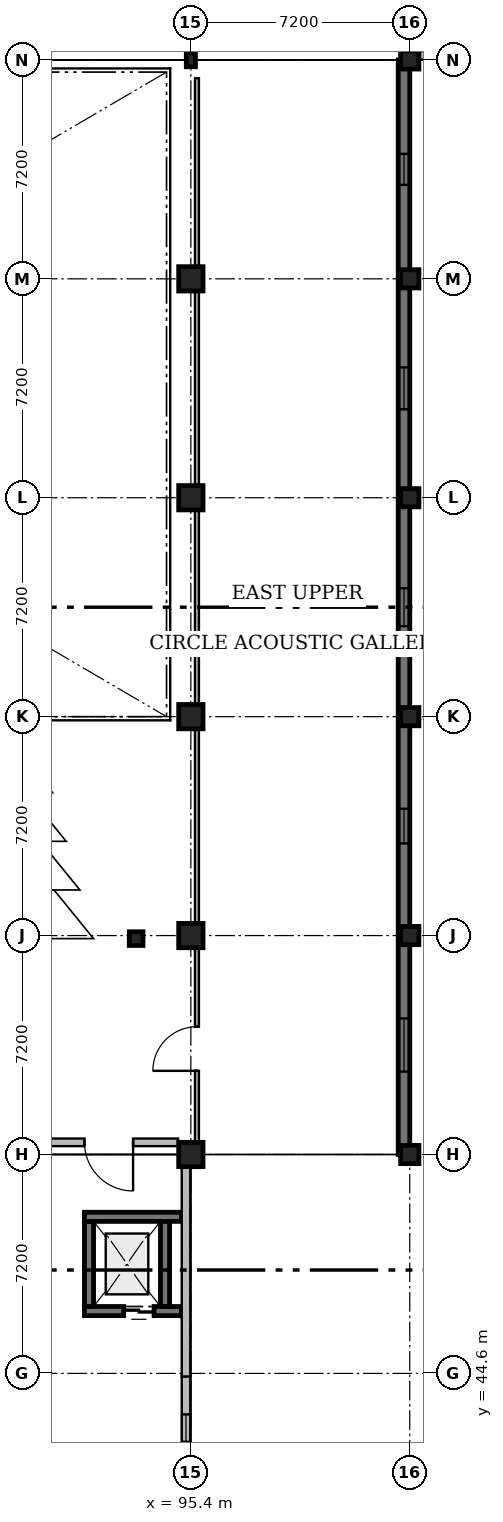
"""IFC4 building model, lengths in metres.
Left out: names, types, materials, properties, quantities, classifications, styles, units other than length and angle.
Written with IfcOpenShell. Run it as: python <this file> out.ifc"""

import sys

from ifc_helpers import new_model, si_unit, direction, frame, frame_2d, origin, origin_2d, place, context, subcontext, project, spatial, rectangle, i_section, extrude, element, fill, save


model = new_model("IFC4")
c1 = context("Model", 3, precision=1e-05, world=origin(), true_north=direction((0.0, 1.0)))
c2 = subcontext(c1, "Body", "Model", "MODEL_VIEW")
j1 = project(units=[si_unit("LENGTHUNIT", "METRE"), si_unit("PLANEANGLEUNIT", "RADIAN")], contexts=[c1])
p1 = place(None, origin())
s1 = spatial("IfcSite", under=j1, at=p1, CompositionType="ELEMENT")
p2 = place(p1, origin())
s2 = spatial("IfcBuilding", under=s1, at=p2, CompositionType="ELEMENT")
p3 = place(p2, frame((0.0, 0.0, 9.0)))
s3 = spatial("IfcBuildingStorey", under=s2, at=p3, CompositionType="ELEMENT", Elevation=9.0)
for number, where, z_axis, x_axis in (
    (1, (95.4, 51.8, 0.0), (0.0, 0.0, 1.0), (1.0, 0.0, 0.0)),
    (2, (95.4, 59.0, 0.0), (0.0, 0.0, 1.0), (1.0, 0.0, 0.0)),
    (3, (95.4, 66.2, 0.0), (0.0, 0.0, 1.0), (1.0, 0.0, 0.0)),
    (4, (95.4, 73.4, 0.0), (0.0, 0.0, 1.0), (1.0, 0.0, 0.0)),
    (5, (95.4, 80.6, 0.0), (0.0, 0.0, 1.0), (1.0, 0.0, 0.0)),
):
    element("IfcColumn", number, at=place(p3, frame(where, z_axis=z_axis, x_axis=x_axis)), inside=s3, PredefinedType="COLUMN", context=c2, shape_type="SweptSolid", body=[
        extrude(rectangle(XDim=0.8, YDim=0.8, at=origin_2d()), origin(), (0.0, 0.0, 1.0), 4.2),
    ])
p4 = place(p3, frame((95.4, 87.8, 0.0), z_axis=(0.0, 0.0, 1.0), x_axis=(1.0, 0.0, 0.0)))
e6 = element("IfcColumn", 6, at=p4, inside=s3, PredefinedType="COLUMN", context=c2, shape_type="SweptSolid", body=[
    extrude(i_section(OverallWidth=0.3, OverallDepth=0.45, WebThickness=0.014, FlangeThickness=0.026, FilletRadius=0.027, at=origin_2d()), origin(), (0.0, 0.0, 1.0), 4.2),
])
for number, where, z_axis, x_axis in (
    (7, (102.6, 51.8, 0.0), (0.0, 0.0, 1.0), (1.0, 0.0, 0.0)),
    (8, (102.6, 59.0, 0.0), (0.0, 0.0, 1.0), (1.0, 0.0, 0.0)),
    (9, (102.6, 66.2, 0.0), (0.0, 0.0, 1.0), (1.0, 0.0, 0.0)),
    (10, (102.6, 73.4, 0.0), (0.0, 0.0, 1.0), (1.0, 0.0, 0.0)),
    (11, (102.6, 80.6, 0.0), (0.0, 0.0, 1.0), (1.0, 0.0, 0.0)),
    (12, (102.6, 87.8, 0.0), (0.0, 0.0, 1.0), (1.0, 0.0, 0.0)),
):
    element("IfcColumn", number, at=place(p3, frame(where, z_axis=z_axis, x_axis=x_axis)), inside=s3, PredefinedType="COLUMN", context=c2, shape_type="SweptSolid", body=[
        extrude(rectangle(XDim=0.6, YDim=0.6, at=origin_2d()), origin(), (0.0, 0.0, 1.0), 4.2),
    ])
p5 = place(p3, frame((93.6, 58.9, 0.0), z_axis=(0.0, 0.0, 1.0), x_axis=(1.0, 0.0, 0.0)))
e13 = element("IfcColumn", 13, at=p5, inside=s3, PredefinedType="COLUMN", context=c2, shape_type="SweptSolid", body=[
    extrude(rectangle(XDim=0.45, YDim=0.45, at=origin_2d()), origin(), (0.0, 0.0, 1.0), 1.05),
])
p6 = place(p3, frame((95.09, 46.65, 0.0), z_axis=(0.0, 0.0, 1.0), x_axis=(-1.0, 0.0, 0.0)))
e14 = element("IfcWall", 14, at=p6, inside=s3, PredefinedType="SOLIDWALL", context=c2, shape_type="SweptSolid", body=[
    extrude(rectangle(XDim=3.19, YDim=0.3, at=frame_2d((1.595, 0.0))), origin(), (0.0, 0.0, 1.0), 4.5),
])
p7 = place(p6, frame((0.9, 0.0, 0.0)))
e15 = element("IfcOpeningElement", 15, at=p7, cuts=e14, PredefinedType="OPENING", context=c2, shape_type="SweptSolid", body=[
    extrude(rectangle(XDim=1.0, YDim=2.1, at=frame_2d((0.5, 1.05))), frame((0.0, 0.17, 0.0), z_axis=(0.0, -1.0, 0.0), x_axis=(1.0, 0.0, 0.0)), (0.0, 0.0, 1.0), 0.34),
])
p8 = place(p3, frame((92.05, 46.8, 0.0), z_axis=(0.0, 0.0, 1.0), x_axis=(0.0, 1.0, 0.0)))
e16 = element("IfcWall", 16, at=p8, inside=s3, PredefinedType="SOLIDWALL", context=c2, shape_type="SweptSolid", body=[
    extrude(rectangle(XDim=2.8, YDim=0.3, at=frame_2d((1.4, 0.0))), origin(), (0.0, 0.0, 1.0), 4.5),
])
p9 = place(p3, frame((91.9, 49.75, 0.0), z_axis=(0.0, 0.0, 1.0), x_axis=(1.0, 0.0, 0.0)))
e17 = element("IfcWall", 17, at=p9, inside=s3, PredefinedType="SOLIDWALL", context=c2, shape_type="SweptSolid", body=[
    extrude(rectangle(XDim=3.19, YDim=0.3, at=frame_2d((1.595, 0.0))), origin(), (0.0, 0.0, 1.0), 4.5),
])
p10 = place(p3, frame((94.55, 49.6, 0.0), z_axis=(0.0, 0.0, 1.0), x_axis=(0.0, -1.0, 0.0)))
e18 = element("IfcWall", 18, at=p10, inside=s3, PredefinedType="SOLIDWALL", context=c2, shape_type="SweptSolid", body=[
    extrude(rectangle(XDim=2.8, YDim=0.3, at=frame_2d((1.4, 0.0))), origin(), (0.0, 0.0, 1.0), 4.5),
])
p11 = place(p3, frame((95.24, 37.705, 0.0), z_axis=(0.0, 0.0, 1.0), x_axis=(0.0, 1.0, 0.0)))
e19 = element("IfcWall", 19, at=p11, inside=s3, PredefinedType="SOLIDWALL", context=c2, shape_type="SweptSolid", body=[
    extrude(rectangle(XDim=6.795, YDim=0.28, at=frame_2d((3.397, 0.0))), origin(), (0.0, 0.0, 1.0), 3.383),
])
p12 = place(p11, frame((1.249, 0.0, 0.95)))
e20 = element("IfcOpeningElement", 20, at=p12, cuts=e19, PredefinedType="OPENING", context=c2, shape_type="SweptSolid", body=[
    extrude(rectangle(XDim=0.9, YDim=1.55, at=frame_2d((0.45, 0.775))), frame((0.0, 0.16, 0.0), z_axis=(0.0, -1.0, 0.0), x_axis=(1.0, 0.0, 0.0)), (0.0, 0.0, 1.0), 0.32),
])
p13 = place(p11, frame((4.646, 0.0, 0.95)))
e21 = element("IfcOpeningElement", 21, at=p13, cuts=e19, PredefinedType="OPENING", context=c2, shape_type="SweptSolid", body=[
    extrude(rectangle(XDim=0.9, YDim=1.55, at=frame_2d((0.45, 0.775))), frame((0.0, 0.16, 0.0), z_axis=(0.0, -1.0, 0.0), x_axis=(1.0, 0.0, 0.0)), (0.0, 0.0, 1.0), 0.32),
])
p14 = place(p3, frame((95.24, 44.5, 0.0), z_axis=(0.0, 0.0, 1.0), x_axis=(0.0, 1.0, 0.0)))
e22 = element("IfcWall", 22, at=p14, inside=s3, PredefinedType="SOLIDWALL", context=c2, shape_type="SweptSolid", body=[
    extrude(rectangle(XDim=7.35, YDim=0.28, at=frame_2d((3.675, 0.0))), origin(), (0.0, 0.0, 1.0), 0.785),
])
p15 = place(p3, frame((102.41, 87.8, 0.0), z_axis=(0.0, 0.0, 1.0), x_axis=(0.0, -1.0, 0.0)))
e23 = element("IfcWall", 23, at=p15, inside=s3, PredefinedType="SOLIDWALL", context=c2, shape_type="SweptSolid", body=[
    extrude(rectangle(XDim=36.0, YDim=0.38, at=frame_2d((18.0, 0.0))), origin(), (0.0, 0.0, 1.0), 3.96),
])
p16 = place(p15, frame((3.09, 0.0, 0.95)))
e24 = element("IfcOpeningElement", 24, at=p16, cuts=e23, PredefinedType="OPENING", context=c2, shape_type="SweptSolid", body=[
    extrude(rectangle(XDim=1.02, YDim=1.8, at=frame_2d((0.51, 0.9))), frame((0.0, 0.21, 0.0), z_axis=(0.0, -1.0, 0.0), x_axis=(1.0, 0.0, 0.0)), (0.0, 0.0, 1.0), 0.42),
])
p17 = place(p15, frame((10.11, 0.0, 0.95)))
e25 = element("IfcOpeningElement", 25, at=p17, cuts=e23, PredefinedType="OPENING", context=c2, shape_type="SweptSolid", body=[
    extrude(rectangle(XDim=1.38, YDim=1.95, at=frame_2d((0.69, 0.975))), frame((0.0, 0.21, 0.0), z_axis=(0.0, -1.0, 0.0), x_axis=(1.0, 0.0, 0.0)), (0.0, 0.0, 1.0), 0.42),
])
p18 = place(p15, frame((17.375, 0.0, 0.95)))
e26 = element("IfcOpeningElement", 26, at=p18, cuts=e23, PredefinedType="OPENING", context=c2, shape_type="SweptSolid", body=[
    extrude(rectangle(XDim=1.25, YDim=1.9, at=frame_2d((0.625, 0.95))), frame((0.0, 0.21, 0.0), z_axis=(0.0, -1.0, 0.0), x_axis=(1.0, 0.0, 0.0)), (0.0, 0.0, 1.0), 0.42),
])
p19 = place(p15, frame((24.63, 0.0, 0.95)))
e27 = element("IfcOpeningElement", 27, at=p19, cuts=e23, PredefinedType="OPENING", context=c2, shape_type="SweptSolid", body=[
    extrude(rectangle(XDim=1.14, YDim=1.85, at=frame_2d((0.57, 0.925))), frame((0.0, 0.21, 0.0), z_axis=(0.0, -1.0, 0.0), x_axis=(1.0, 0.0, 0.0)), (0.0, 0.0, 1.0), 0.42),
])
p20 = place(p15, frame((31.525, 0.0, 0.95)))
e28 = element("IfcOpeningElement", 28, at=p20, cuts=e23, PredefinedType="OPENING", context=c2, shape_type="SweptSolid", body=[
    extrude(rectangle(XDim=1.75, YDim=1.65, at=frame_2d((0.875, 0.825))), frame((0.0, 0.21, 0.0), z_axis=(0.0, -1.0, 0.0), x_axis=(1.0, 0.0, 0.0)), (0.0, 0.0, 1.0), 0.42),
])
p21 = place(p3, frame((102.905, 87.95, 0.0), z_axis=(0.0, 0.0, 1.0), x_axis=(1.0, 0.0, 0.0)))
e29 = element("IfcWall", 29, at=p21, inside=s3, PredefinedType="SOLIDWALL", context=c2, shape_type="SweptSolid", body=[
    extrude(rectangle(XDim=6.59, YDim=0.28, at=frame_2d((3.295, 0.0))), origin(), (0.0, 0.0, 1.0), 3.263),
])
p22 = place(p21, frame((0.972, 0.0, 0.95)))
e30 = element("IfcOpeningElement", 30, at=p22, cuts=e29, PredefinedType="OPENING", context=c2, shape_type="SweptSolid", body=[
    extrude(rectangle(XDim=1.35, YDim=1.7, at=frame_2d((0.675, 0.85))), frame((0.0, 0.16, 0.0), z_axis=(0.0, -1.0, 0.0), x_axis=(1.0, 0.0, 0.0)), (0.0, 0.0, 1.0), 0.32),
])
p23 = place(p21, frame((4.268, 0.0, 0.95)))
e31 = element("IfcOpeningElement", 31, at=p23, cuts=e29, PredefinedType="OPENING", context=c2, shape_type="SweptSolid", body=[
    extrude(rectangle(XDim=1.35, YDim=1.7, at=frame_2d((0.675, 0.85))), frame((0.0, 0.16, 0.0), z_axis=(0.0, -1.0, 0.0), x_axis=(1.0, 0.0, 0.0)), (0.0, 0.0, 1.0), 0.32),
])
p24 = place(p3, frame((94.98, 52.2, 0.0), z_axis=(0.0, 0.0, 1.0), x_axis=(-1.0, 0.0, 0.0)))
e32 = element("IfcWall", 32, at=p24, inside=s3, PredefinedType="PARTITIONING", context=c2, shape_type="SweptSolid", body=[
    extrude(rectangle(XDim=4.56, YDim=0.25, at=frame_2d((2.28, 0.0))), origin(), (0.0, 0.0, 1.0), 3.95),
])
p25 = place(p24, frame((1.48, 0.0, 0.0)))
e33 = element("IfcOpeningElement", 33, at=p25, cuts=e32, PredefinedType="OPENING", context=c2, shape_type="SweptSolid", body=[
    extrude(rectangle(XDim=1.6, YDim=2.25, at=frame_2d((0.8, 1.125))), frame((0.0, 0.145, 0.0), z_axis=(0.0, -1.0, 0.0), x_axis=(1.0, 0.0, 0.0)), (0.0, 0.0, 1.0), 0.29),
])
p26 = place(p3, frame((95.6, 52.22, 0.0), z_axis=(0.0, 0.0, 1.0), x_axis=(0.0, 1.0, 0.0)))
e34 = element("IfcWall", 34, at=p26, inside=s3, PredefinedType="PARTITIONING", context=c2, shape_type="SweptSolid", body=[
    extrude(rectangle(XDim=6.36, YDim=0.13, at=frame_2d((3.18, 0.0))), origin(), (0.0, 0.0, 1.0), 3.56),
])
p27 = place(p26, frame((2.331, 0.0, 0.0)))
e35 = element("IfcOpeningElement", 35, at=p27, cuts=e34, PredefinedType="OPENING", context=c2, shape_type="SweptSolid", body=[
    extrude(rectangle(XDim=1.45, YDim=2.2, at=frame_2d((0.725, 1.1))), frame((0.0, 0.085, 0.0), z_axis=(0.0, -1.0, 0.0), x_axis=(1.0, 0.0, 0.0)), (0.0, 0.0, 1.0), 0.17),
])
p28 = place(p3, frame((95.6, 59.42, 0.0), z_axis=(0.0, 0.0, 1.0), x_axis=(0.0, 1.0, 0.0)))
e36 = element("IfcWall", 36, at=p28, inside=s3, PredefinedType="PARTITIONING", context=c2, shape_type="SweptSolid", body=[
    extrude(rectangle(XDim=6.36, YDim=0.13, at=frame_2d((3.18, 0.0))), origin(), (0.0, 0.0, 1.0), 3.65),
])
for number, where, z_axis, x_axis in (
    (37, (95.6, 66.62, 0.0), (0.0, 0.0, 1.0), (0.0, 1.0, 0.0)),
    (38, (95.6, 73.82, 0.0), (0.0, 0.0, 1.0), (0.0, 1.0, 0.0)),
):
    element("IfcWall", number, at=place(p3, frame(where, z_axis=z_axis, x_axis=x_axis)), inside=s3, PredefinedType="PARTITIONING", context=c2, shape_type="SweptSolid", body=[
        extrude(rectangle(XDim=6.36, YDim=0.13, at=frame_2d((3.18, 0.0))), origin(), (0.0, 0.0, 1.0), 3.66),
    ])
p29 = place(p3, frame((95.6, 81.02, 0.0), z_axis=(0.0, 0.0, 1.0), x_axis=(0.0, 1.0, 0.0)))
e39 = element("IfcWall", 39, at=p29, inside=s3, PredefinedType="PARTITIONING", context=c2, shape_type="SweptSolid", body=[
    extrude(rectangle(XDim=6.18, YDim=0.13, at=frame_2d((3.09, 0.0))), origin(), (0.0, 0.0, 1.0), 3.65),
])
p30 = place(p7, origin())
e40 = element("IfcDoor", 40, at=p30, inside=s3, OperationType="DOUBLE_DOOR_SLIDING", PredefinedType="DOOR", context=c2, shape_type="SweptSolid", body=[
    extrude(rectangle(XDim=1.0, YDim=2.1, at=frame_2d((0.5, 1.05))), frame((0.0, 0.025, 0.0), z_axis=(0.0, -1.0, 0.0), x_axis=(1.0, 0.0, 0.0)), (0.0, 0.0, 1.0), 0.05),
])
fill(e15, e40)
p31 = place(p13, origin())
e41 = element("IfcWindow", 41, at=p31, inside=s3, PartitioningType="SINGLE_PANEL", PredefinedType="WINDOW", context=c2, shape_type="SweptSolid", body=[
    extrude(rectangle(XDim=0.9, YDim=1.55, at=frame_2d((0.45, 0.775))), frame((0.0, 0.03, 0.0), z_axis=(0.0, -1.0, 0.0), x_axis=(1.0, 0.0, 0.0)), (0.0, 0.0, 1.0), 0.06),
])
fill(e21, e41)
p32 = place(p16, origin())
e42 = element("IfcWindow", 42, at=p32, inside=s3, PartitioningType="SINGLE_PANEL", PredefinedType="WINDOW", context=c2, shape_type="SweptSolid", body=[
    extrude(rectangle(XDim=1.02, YDim=1.8, at=frame_2d((0.51, 0.9))), frame((0.0, 0.03, 0.0), z_axis=(0.0, -1.0, 0.0), x_axis=(1.0, 0.0, 0.0)), (0.0, 0.0, 1.0), 0.06),
])
fill(e24, e42)
p33 = place(p17, origin())
e43 = element("IfcWindow", 43, at=p33, inside=s3, PartitioningType="SINGLE_PANEL", PredefinedType="WINDOW", context=c2, shape_type="SweptSolid", body=[
    extrude(rectangle(XDim=1.38, YDim=1.95, at=frame_2d((0.69, 0.975))), frame((0.0, 0.03, 0.0), z_axis=(0.0, -1.0, 0.0), x_axis=(1.0, 0.0, 0.0)), (0.0, 0.0, 1.0), 0.06),
])
fill(e25, e43)
p34 = place(p18, origin())
e44 = element("IfcWindow", 44, at=p34, inside=s3, PartitioningType="SINGLE_PANEL", PredefinedType="WINDOW", context=c2, shape_type="SweptSolid", body=[
    extrude(rectangle(XDim=1.25, YDim=1.9, at=frame_2d((0.625, 0.95))), frame((0.0, 0.03, 0.0), z_axis=(0.0, -1.0, 0.0), x_axis=(1.0, 0.0, 0.0)), (0.0, 0.0, 1.0), 0.06),
])
fill(e26, e44)
p35 = place(p19, origin())
e45 = element("IfcWindow", 45, at=p35, inside=s3, PartitioningType="SINGLE_PANEL", PredefinedType="WINDOW", context=c2, shape_type="SweptSolid", body=[
    extrude(rectangle(XDim=1.14, YDim=1.85, at=frame_2d((0.57, 0.925))), frame((0.0, 0.03, 0.0), z_axis=(0.0, -1.0, 0.0), x_axis=(1.0, 0.0, 0.0)), (0.0, 0.0, 1.0), 0.06),
])
fill(e27, e45)
p36 = place(p20, origin())
e46 = element("IfcWindow", 46, at=p36, inside=s3, PartitioningType="SINGLE_PANEL", PredefinedType="WINDOW", context=c2, shape_type="SweptSolid", body=[
    extrude(rectangle(XDim=1.75, YDim=1.65, at=frame_2d((0.875, 0.825))), frame((0.0, 0.03, 0.0), z_axis=(0.0, -1.0, 0.0), x_axis=(1.0, 0.0, 0.0)), (0.0, 0.0, 1.0), 0.06),
])
fill(e28, e46)
p37 = place(p25, origin())
e47 = element("IfcDoor", 47, at=p37, inside=s3, OperationType="DOUBLE_DOOR_SINGLE_SWING", PredefinedType="DOOR", context=c2, shape_type="SweptSolid", body=[
    extrude(rectangle(XDim=1.6, YDim=2.25, at=frame_2d((0.8, 1.125))), frame((0.0, 0.025, 0.0), z_axis=(0.0, -1.0, 0.0), x_axis=(1.0, 0.0, 0.0)), (0.0, 0.0, 1.0), 0.05),
])
fill(e33, e47)
p38 = place(p27, origin())
e48 = element("IfcDoor", 48, at=p38, inside=s3, OperationType="DOUBLE_DOOR_SINGLE_SWING", PredefinedType="DOOR", context=c2, shape_type="SweptSolid", body=[
    extrude(rectangle(XDim=1.45, YDim=2.2, at=frame_2d((0.725, 1.1))), frame((0.0, 0.025, 0.0), z_axis=(0.0, -1.0, 0.0), x_axis=(1.0, 0.0, 0.0)), (0.0, 0.0, 1.0), 0.05),
])
fill(e35, e48)
save(model, sys.argv[1])
